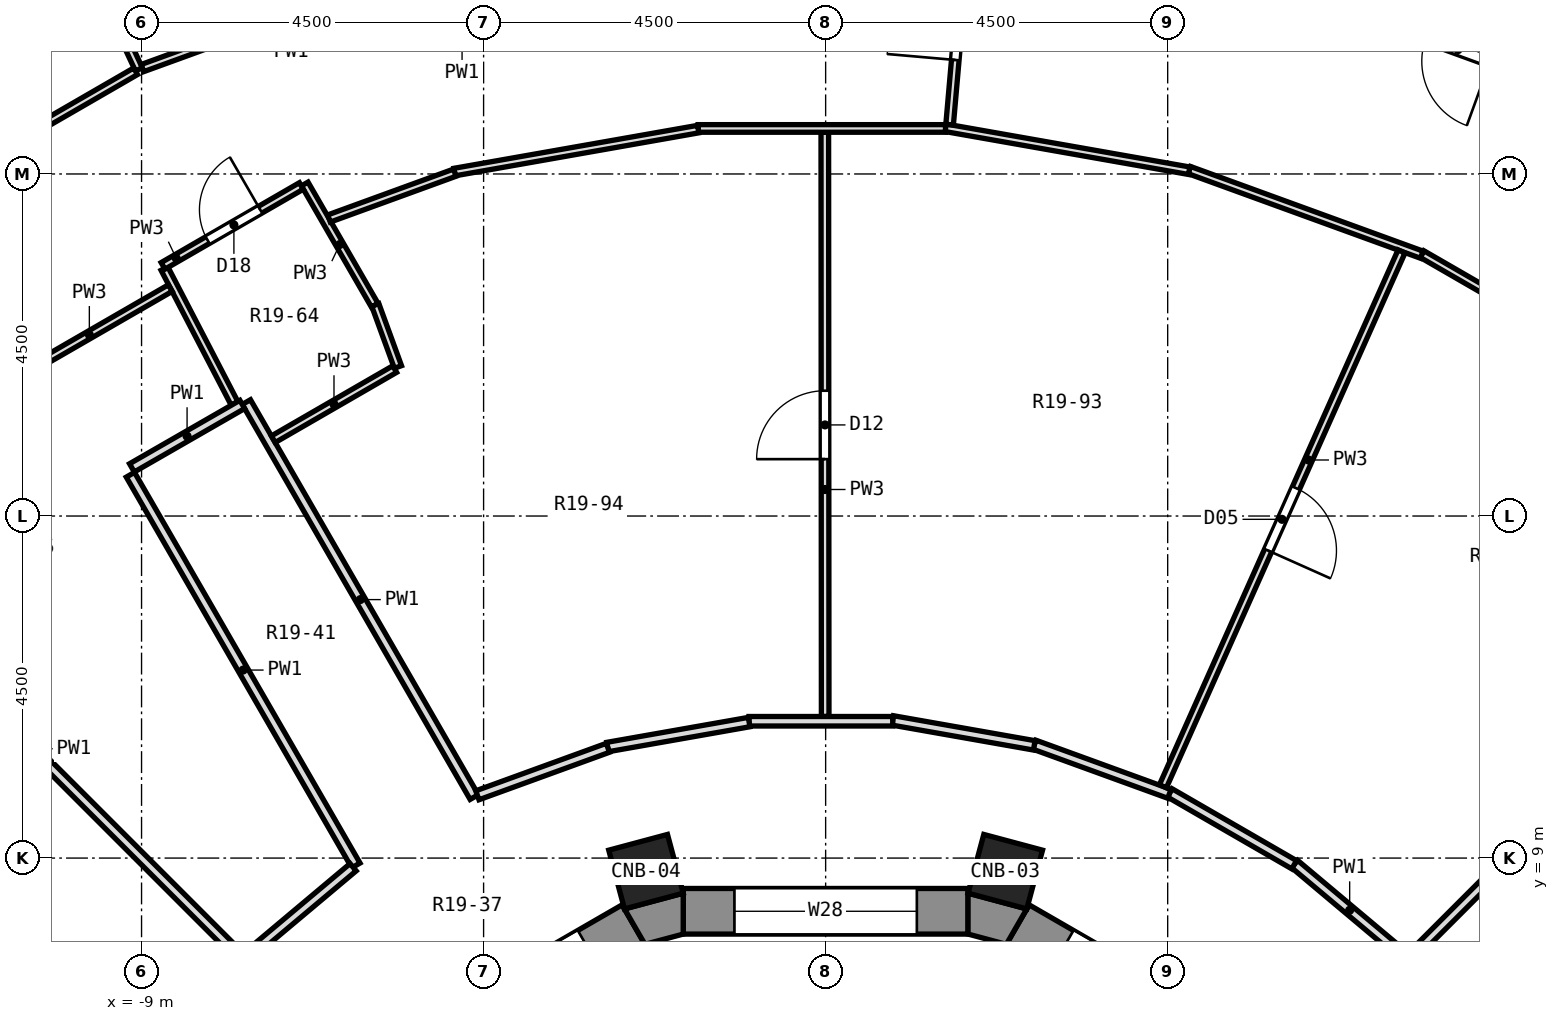
"""IFC4 building model, lengths in metres.
Left out: names, types, materials, properties, quantities, classifications, styles, units other than length and angle.
Written with IfcOpenShell. Run it as: python <this file> out.ifc"""

import sys

from ifc_helpers import new_model, si_unit, direction, frame, frame_2d, origin, origin_2d, place, context, subcontext, project, spatial, polyline, rectangle, outline, extrude, element, fill, save


model = new_model("IFC4")
c1 = context("Model", 3, precision=1e-05, world=origin(), true_north=direction((0.0, 1.0)))
c2 = subcontext(c1, "Body", "Model", "MODEL_VIEW")
j1 = project(units=[si_unit("LENGTHUNIT", "METRE"), si_unit("PLANEANGLEUNIT", "RADIAN")], contexts=[c1])
p1 = place(None, origin())
s1 = spatial("IfcSite", under=j1, at=p1, CompositionType="ELEMENT")
p2 = place(p1, origin())
s2 = spatial("IfcBuilding", under=s1, at=p2, CompositionType="ELEMENT")
p3 = place(p2, frame((0.0, 0.0, 111.7)))
s3 = spatial("IfcBuildingStorey", under=s2, at=p3, CompositionType="ELEMENT", Elevation=111.7)
for number, where, z_axis, x_axis in (
    (1, (2.364, 8.821, 0.0), (0.0, 0.0, 1.0), (0.259, 0.966, 0.0)),
    (2, (-2.364, 8.821, 0.0), (0.0, 0.0, 1.0), (-0.259, 0.966, 0.0)),
):
    element("IfcColumn", number, at=place(p3, frame(where, z_axis=z_axis, x_axis=x_axis)), inside=s3, PredefinedType="COLUMN", context=c2, shape_type="SweptSolid", body=[
        extrude(rectangle(XDim=0.8, YDim=0.8, at=origin_2d()), origin(), (0.0, 0.0, 1.0), 3.3),
    ])
p4 = place(p3, frame((5.773, 6.251, 0.0), z_axis=(0.0, 0.0, 1.0), x_axis=(-0.86604563398, 0.499964958637, 0.0)))
e3 = element("IfcWall", 3, at=p4, inside=s3, PredefinedType="SOLIDWALL", context=c2, shape_type="SweptSolid", body=[
    extrude(rectangle(XDim=3.747, YDim=0.6, at=frame_2d((1.874, 0.0))), origin(), (0.0, 0.0, 1.0), 2.8),
])
p5 = place(p4, frame((0.674, 0.0, 0.9)))
e4 = element("IfcOpeningElement", 4, at=p5, cuts=e3, PredefinedType="OPENING", context=c2, shape_type="SweptSolid", body=[
    extrude(rectangle(XDim=2.4, YDim=1.8, at=frame_2d((1.2, 0.9))), frame((0.0, 0.312, 0.0), z_axis=(0.0, -1.0, 0.0), x_axis=(1.0, 0.0, 0.0)), (0.0, 0.0, 1.0), 0.624),
])
p6 = place(p3, frame((1.874, 8.3, 0.0), z_axis=(0.0, 0.0, 1.0), x_axis=(-1.0, 0.0, 0.0)))
e5 = element("IfcWall", 5, at=p6, inside=s3, PredefinedType="SOLIDWALL", context=c2, shape_type="SweptSolid", body=[
    extrude(rectangle(XDim=3.748, YDim=0.6, at=frame_2d((1.874, 0.0))), origin(), (0.0, 0.0, 1.0), 2.8),
])
p7 = place(p6, frame((0.674, 0.0, 0.9)))
e6 = element("IfcOpeningElement", 6, at=p7, cuts=e5, PredefinedType="OPENING", context=c2, shape_type="SweptSolid", body=[
    extrude(rectangle(XDim=2.4, YDim=1.8, at=frame_2d((1.2, 0.9))), frame((0.0, 0.312, 0.0), z_axis=(0.0, -1.0, 0.0), x_axis=(1.0, 0.0, 0.0)), (0.0, 0.0, 1.0), 0.624),
])
p8 = place(p3, frame((-2.527, 8.125, 0.0), z_axis=(0.0, 0.0, 1.0), x_axis=(-0.86604563398, -0.499964958637, 0.0)))
e7 = element("IfcWall", 7, at=p8, inside=s3, PredefinedType="SOLIDWALL", context=c2, shape_type="SweptSolid", body=[
    extrude(rectangle(XDim=3.747, YDim=0.6, at=frame_2d((1.874, 0.0))), origin(), (0.0, 0.0, 1.0), 2.8),
])
p9 = place(p8, frame((0.674, 0.0, 0.9)))
e8 = element("IfcOpeningElement", 8, at=p9, cuts=e7, PredefinedType="OPENING", context=c2, shape_type="SweptSolid", body=[
    extrude(rectangle(XDim=2.4, YDim=1.8, at=frame_2d((1.2, 0.9))), frame((0.0, 0.312, 0.0), z_axis=(0.0, -1.0, 0.0), x_axis=(1.0, 0.0, 0.0)), (0.0, 0.0, 1.0), 0.624),
])
p10 = place(p3, origin())
e9 = element("IfcWall", 9, at=p10, inside=s3, PredefinedType="SOLIDWALL", context=c2, shape_type="SweptSolid", body=[
    extrude(outline(polyline([(1.874, 8.538), (1.874, 8.0), (2.377, 7.865), (2.646, 8.331), (1.874, 8.538)])), origin(), (0.0, 0.0, 1.0), 2.8),
])
p11 = place(p3, origin())
e10 = element("IfcWall", 10, at=p11, inside=s3, PredefinedType="SOLIDWALL", context=c2, shape_type="SweptSolid", body=[
    extrude(outline(polyline([(-2.646, 8.331), (-2.377, 7.865), (-1.874, 8.0), (-1.874, 8.538), (-2.646, 8.331)])), origin(), (0.0, 0.0, 1.0), 2.8),
])
p12 = place(p3, frame((-0.011, 18.549, 0.0), z_axis=(0.0, 0.0, 1.0), x_axis=(0.00063524317, -0.999999798233, 0.0)))
e11 = element("IfcWall", 11, at=p12, inside=s3, PredefinedType="PARTITIONING", context=c2, shape_type="SweptSolid", body=[
    extrude(rectangle(XDim=7.687, YDim=0.1, at=frame_2d((3.843, 0.0))), origin(), (0.0, 0.0, 1.0), 2.8),
])
p13 = place(p12, frame((3.4, 0.0, 0.0)))
e12 = element("IfcOpeningElement", 12, at=p13, cuts=e11, PredefinedType="OPENING", context=c2, shape_type="SweptSolid", body=[
    extrude(rectangle(XDim=0.9, YDim=2.1, at=frame_2d((0.45, 1.05))), frame((0.0, 0.062, 0.0), z_axis=(0.0, -1.0, 0.0), x_axis=(1.0, 0.0, 0.0)), (0.0, 0.0, 1.0), 0.124),
])
p14 = place(p3, frame((-5.925, 16.279, 0.0), z_axis=(0.0, 0.0, 1.0), x_axis=(0.3425983225, -0.939481979295, 0.0)))
e13 = element("IfcWall", 13, at=p14, inside=s3, PredefinedType="PARTITIONING", context=c2, shape_type="SweptSolid", body=[
    extrude(rectangle(XDim=0.871, YDim=0.1, at=frame_2d((0.436, 0.0))), origin(), (0.0, 0.0, 1.0), 2.8),
])
p15 = place(p3, frame((-10.847, 23.26, 0.0), z_axis=(0.0, 0.0, 1.0), x_axis=(0.422829334028, -0.906209332487, 0.0)))
e14 = element("IfcWall", 14, at=p15, inside=s3, PredefinedType="PARTITIONING", context=c2, shape_type="SweptSolid", body=[
    extrude(rectangle(XDim=4.286, YDim=0.1, at=frame_2d((2.143, 0.0))), origin(), (0.0, 0.0, 1.0), 2.8),
])
p16 = place(p3, frame((-8.699, 16.756, 0.0), z_axis=(0.0, 0.0, 1.0), x_axis=(0.461029785453, -0.887384661195, 0.0)))
e15 = element("IfcWall", 15, at=p16, inside=s3, PredefinedType="PARTITIONING", context=c2, shape_type="SweptSolid", body=[
    extrude(rectangle(XDim=2.0, YDim=0.1, at=frame_2d((1.0, 0.0))), origin(), (0.0, 0.0, 1.0), 2.8),
])
p17 = place(p3, frame((-9.147, 14.043, 0.0), z_axis=(0.0, 0.0, 1.0), x_axis=(0.499891007886, -0.866088321267, 0.0)))
e16 = element("IfcWall", 16, at=p17, inside=s3, PredefinedType="PARTITIONING", context=c2, shape_type="SweptSolid", body=[
    extrude(rectangle(XDim=5.935, YDim=0.125, at=frame_2d((2.967, 0.0))), origin(), (0.0, 0.0, 1.0), 2.8),
])
p18 = place(p3, frame((-7.621, 14.999, 0.0), z_axis=(0.0, 0.0, 1.0), x_axis=(0.499745940409, -0.866172035478, 0.0)))
e17 = element("IfcWall", 17, at=p18, inside=s3, PredefinedType="PARTITIONING", context=c2, shape_type="SweptSolid", body=[
    extrude(rectangle(XDim=5.999, YDim=0.125, at=frame_2d((3.0, 0.0))), origin(), (0.0, 0.0, 1.0), 2.8),
])
p19 = place(p3, frame((-6.853, 17.868, 0.0), z_axis=(0.0, 0.0, 1.0), x_axis=(0.499963655964, -0.866046386007, 0.0)))
e18 = element("IfcWall", 18, at=p19, inside=s3, PredefinedType="PARTITIONING", context=c2, shape_type="SweptSolid", body=[
    extrude(rectangle(XDim=1.84, YDim=0.1, at=frame_2d((0.92, 0.0))), origin(), (0.0, 0.0, 1.0), 2.8),
])
p20 = place(p3, frame((-13.167, 13.167, 0.0), z_axis=(0.0, 0.0, 1.0), x_axis=(0.707106781187, -0.707106781187, 0.0)))
e19 = element("IfcWall", 19, at=p20, inside=s3, PredefinedType="PARTITIONING", context=c2, shape_type="SweptSolid", body=[
    extrude(rectangle(XDim=7.716, YDim=0.125, at=frame_2d((3.858, 0.0))), origin(), (0.0, 0.0, 1.0), 2.8),
])
p21 = place(p3, frame((6.169, 8.922, 0.0), z_axis=(0.0, 0.0, 1.0), x_axis=(0.766048022013, -0.642783344503, 0.0)))
e20 = element("IfcWall", 20, at=p21, inside=s3, PredefinedType="PARTITIONING", context=c2, shape_type="SweptSolid", body=[
    extrude(rectangle(XDim=1.892, YDim=0.125, at=frame_2d((0.946, 0.0))), origin(), (0.0, 0.0, 1.0), 2.8),
])
p22 = place(p3, frame((4.527, 9.858, 0.0), z_axis=(0.0, 0.0, 1.0), x_axis=(0.86592101019, -0.500180771434, 0.0)))
e21 = element("IfcWall", 21, at=p22, inside=s3, PredefinedType="PARTITIONING", context=c2, shape_type="SweptSolid", body=[
    extrude(rectangle(XDim=1.89, YDim=0.125, at=frame_2d((0.945, 0.0))), origin(), (0.0, 0.0, 1.0), 2.8),
])
p23 = place(p3, frame((7.846, 16.946, 0.0), z_axis=(0.0, 0.0, 1.0), x_axis=(0.866135643811, -0.499809010043, 0.0)))
e22 = element("IfcWall", 22, at=p23, inside=s3, PredefinedType="PARTITIONING", context=c2, shape_type="SweptSolid", body=[
    extrude(rectangle(XDim=3.256, YDim=0.1, at=frame_2d((1.628, 0.0))), origin(), (0.0, 0.0, 1.0), 2.8),
])
p24 = place(p23, frame((1.228, 0.0, 0.0)))
e23 = element("IfcOpeningElement", 23, at=p24, cuts=e22, PredefinedType="OPENING", context=c2, shape_type="SweptSolid", body=[
    extrude(rectangle(XDim=0.9, YDim=2.1, at=frame_2d((0.45, 1.05))), frame((0.0, 0.062, 0.0), z_axis=(0.0, -1.0, 0.0), x_axis=(1.0, 0.0, 0.0)), (0.0, 0.0, 1.0), 0.124),
])
p25 = place(p3, frame((2.746, 10.492, 0.0), z_axis=(0.0, 0.0, 1.0), x_axis=(0.939744390825, -0.341877872803, 0.0)))
e24 = element("IfcWall", 24, at=p25, inside=s3, PredefinedType="PARTITIONING", context=c2, shape_type="SweptSolid", body=[
    extrude(rectangle(XDim=1.89, YDim=0.125, at=frame_2d((0.945, 0.0))), origin(), (0.0, 0.0, 1.0), 2.8),
])
p26 = place(p3, frame((4.784, 18.051, 0.0), z_axis=(0.0, 0.0, 1.0), x_axis=(0.939697033511, -0.34200801922, 0.0)))
e25 = element("IfcWall", 25, at=p26, inside=s3, PredefinedType="PARTITIONING", context=c2, shape_type="SweptSolid", body=[
    extrude(rectangle(XDim=3.255, YDim=0.1, at=frame_2d((1.627, 0.0))), origin(), (0.0, 0.0, 1.0), 2.8),
])
p27 = place(p3, frame((7.652, 19.879, 0.0), z_axis=(0.0, 0.0, 1.0), x_axis=(0.939813657692, -0.341687413896, 0.0)))
e26 = element("IfcWall", 26, at=p27, inside=s3, PredefinedType="PARTITIONING", context=c2, shape_type="SweptSolid", body=[
    extrude(rectangle(XDim=1.409, YDim=0.125, at=frame_2d((0.705, 0.0))), origin(), (0.0, 0.0, 1.0), 2.8),
])
p28 = place(p27, frame((0.261, 0.0, 0.0)))
e27 = element("IfcOpeningElement", 27, at=p28, cuts=e26, PredefinedType="OPENING", context=c2, shape_type="SweptSolid", body=[
    extrude(rectangle(XDim=0.9, YDim=2.1, at=frame_2d((0.45, 1.05))), frame((0.0, 0.074, 0.0), z_axis=(0.0, -1.0, 0.0), x_axis=(1.0, 0.0, 0.0)), (0.0, 0.0, 1.0), 0.149),
])
p29 = place(p3, frame((0.883, 10.811, 0.0), z_axis=(0.0, 0.0, 1.0), x_axis=(0.984822536066, -0.173564317922, 0.0)))
e28 = element("IfcWall", 28, at=p29, inside=s3, PredefinedType="PARTITIONING", context=c2, shape_type="SweptSolid", body=[
    extrude(rectangle(XDim=1.891, YDim=0.125, at=frame_2d((0.945, 0.0))), origin(), (0.0, 0.0, 1.0), 2.8),
])
p30 = place(p3, frame((1.577, 18.608, 0.0), z_axis=(0.0, 0.0, 1.0), x_axis=(0.984812236301, -0.173622749755, 0.0)))
e29 = element("IfcWall", 29, at=p30, inside=s3, PredefinedType="PARTITIONING", context=c2, shape_type="SweptSolid", body=[
    extrude(rectangle(XDim=3.255, YDim=0.1, at=frame_2d((1.628, 0.0))), origin(), (0.0, 0.0, 1.0), 2.8),
])
p31 = place(p3, frame((-1.009, 10.8, 0.0), z_axis=(0.0, 0.0, 1.0), x_axis=(1.0, 0.0, 0.0)))
e30 = element("IfcWall", 30, at=p31, inside=s3, PredefinedType="PARTITIONING", context=c2, shape_type="SweptSolid", body=[
    extrude(rectangle(XDim=1.891, YDim=0.125, at=frame_2d((0.946, 0.0))), origin(), (0.0, 0.0, 1.0), 2.8),
])
p32 = place(p3, frame((-1.678, 18.599, 0.0), z_axis=(0.0, 0.0, 1.0), x_axis=(1.0, 0.0, 0.0)))
e31 = element("IfcWall", 31, at=p32, inside=s3, PredefinedType="PARTITIONING", context=c2, shape_type="SweptSolid", body=[
    extrude(rectangle(XDim=3.255, YDim=0.1, at=frame_2d((1.627, 0.0))), origin(), (0.0, 0.0, 1.0), 2.8),
])
p33 = place(p3, frame((-2.868, 10.461, 0.0), z_axis=(0.0, 0.0, 1.0), x_axis=(0.984818645033, 0.173586394613, 0.0)))
e32 = element("IfcWall", 32, at=p33, inside=s3, PredefinedType="PARTITIONING", context=c2, shape_type="SweptSolid", body=[
    extrude(rectangle(XDim=1.89, YDim=0.125, at=frame_2d((0.945, 0.0))), origin(), (0.0, 0.0, 1.0), 2.8),
])
p34 = place(p3, frame((-4.882, 18.025, 0.0), z_axis=(0.0, 0.0, 1.0), x_axis=(0.984812236301, 0.173622749755, 0.0)))
e33 = element("IfcWall", 33, at=p34, inside=s3, PredefinedType="PARTITIONING", context=c2, shape_type="SweptSolid", body=[
    extrude(rectangle(XDim=3.255, YDim=0.1, at=frame_2d((1.628, 0.0))), origin(), (0.0, 0.0, 1.0), 2.8),
])
p35 = place(p3, frame((-4.582, 9.826, 0.0), z_axis=(0.0, 0.0, 1.0), x_axis=(0.939758316357, 0.341839592261, 0.0)))
e34 = element("IfcWall", 34, at=p35, inside=s3, PredefinedType="PARTITIONING", context=c2, shape_type="SweptSolid", body=[
    extrude(rectangle(XDim=1.828, YDim=0.125, at=frame_2d((0.914, 0.0))), origin(), (0.0, 0.0, 1.0), 2.8),
])
p36 = place(p3, frame((-6.534, 17.414, 0.0), z_axis=(0.0, 0.0, 1.0), x_axis=(0.93961928365, 0.342221568275, 0.0)))
e35 = element("IfcWall", 35, at=p36, inside=s3, PredefinedType="PARTITIONING", context=c2, shape_type="SweptSolid", body=[
    extrude(rectangle(XDim=1.761, YDim=0.1, at=frame_2d((0.881, 0.0))), origin(), (0.0, 0.0, 1.0), 2.8),
])
p37 = place(p3, frame((-8.988, 19.393, 0.0), z_axis=(0.0, 0.0, 1.0), x_axis=(0.939693168022, 0.342018639804, 0.0)))
e36 = element("IfcWall", 36, at=p37, inside=s3, PredefinedType="PARTITIONING", context=c2, shape_type="SweptSolid", body=[
    extrude(rectangle(XDim=2.205, YDim=0.1, at=frame_2d((1.103, 0.0))), origin(), (0.0, 0.0, 1.0), 2.8),
])
p38 = place(p3, frame((-9.127, 14.134, 0.0), z_axis=(0.0, 0.0, 1.0), x_axis=(0.866992941954, 0.498320417604, 0.0)))
e37 = element("IfcWall", 37, at=p38, inside=s3, PredefinedType="PARTITIONING", context=c2, shape_type="SweptSolid", body=[
    extrude(rectangle(XDim=1.674, YDim=0.125, at=frame_2d((0.837, 0.0))), origin(), (0.0, 0.0, 1.0), 2.8),
])
p39 = place(p3, frame((-7.267, 14.51, 0.0), z_axis=(0.0, 0.0, 1.0), x_axis=(0.865945322787, 0.500138678712, 0.0)))
e38 = element("IfcWall", 38, at=p39, inside=s3, PredefinedType="PARTITIONING", context=c2, shape_type="SweptSolid", body=[
    extrude(rectangle(XDim=1.845, YDim=0.1, at=frame_2d((0.922, 0.0))), origin(), (0.0, 0.0, 1.0), 2.8),
])
p40 = place(p3, frame((-10.753, 15.269, 0.0), z_axis=(0.0, 0.0, 1.0), x_axis=(0.866079862983, 0.499905662036, 0.0)))
e39 = element("IfcWall", 39, at=p40, inside=s3, PredefinedType="PARTITIONING", context=c2, shape_type="SweptSolid", body=[
    extrude(rectangle(XDim=2.461, YDim=0.1, at=frame_2d((1.23, 0.0))), origin(), (0.0, 0.0, 1.0), 2.8),
])
p41 = place(p3, frame((-8.717, 16.791, 0.0), z_axis=(0.0, 0.0, 1.0), x_axis=(0.865866191869, 0.50027566179, 0.0)))
e40 = element("IfcWall", 40, at=p41, inside=s3, PredefinedType="PARTITIONING", context=c2, shape_type="SweptSolid", body=[
    extrude(rectangle(XDim=2.101, YDim=0.1, at=frame_2d((1.05, 0.0))), origin(), (0.0, 0.0, 1.0), 2.8),
])
p42 = place(p41, frame((0.677, 0.0, 0.0)))
e41 = element("IfcOpeningElement", 41, at=p42, cuts=e40, PredefinedType="OPENING", context=c2, shape_type="SweptSolid", body=[
    extrude(rectangle(XDim=0.8, YDim=2.1, at=frame_2d((0.4, 1.05))), frame((0.0, 0.062, 0.0), z_axis=(0.0, -1.0, 0.0), x_axis=(1.0, 0.0, 0.0)), (0.0, 0.0, 1.0), 0.124),
])
p43 = place(p3, frame((-10.901, 18.298, 0.0), z_axis=(0.0, 0.0, 1.0), x_axis=(0.865841622723, 0.50031818312, 0.0)))
e42 = element("IfcWall", 42, at=p43, inside=s3, PredefinedType="PARTITIONING", context=c2, shape_type="SweptSolid", body=[
    extrude(rectangle(XDim=2.105, YDim=0.1, at=frame_2d((1.052, 0.0))), origin(), (0.0, 0.0, 1.0), 2.8),
])
p44 = place(p3, frame((-7.617, 7.704, 0.0), z_axis=(0.0, 0.0, 1.0), x_axis=(0.7660388271, 0.642794302538, 0.0)))
e43 = element("IfcWall", 43, at=p44, inside=s3, PredefinedType="PARTITIONING", context=c2, shape_type="SweptSolid", body=[
    extrude(rectangle(XDim=1.828, YDim=0.125, at=frame_2d((0.914, 0.0))), origin(), (0.0, 0.0, 1.0), 2.8),
])
p45 = place(p3, frame((7.71, 7.71, 0.0), z_axis=(0.0, 0.0, 1.0), x_axis=(0.707106781187, 0.707106781187, 0.0)))
e44 = element("IfcWall", 44, at=p45, inside=s3, PredefinedType="PARTITIONING", context=c2, shape_type="SweptSolid", body=[
    extrude(rectangle(XDim=7.587, YDim=0.125, at=frame_2d((3.793, 0.0))), origin(), (0.0, 0.0, 1.0), 2.8),
])
p46 = place(p3, frame((4.437, 9.945, 0.0), z_axis=(0.0, 0.0, 1.0), x_axis=(0.407452204653, 0.913226533191, 0.0)))
e45 = element("IfcWall", 45, at=p46, inside=s3, PredefinedType="PARTITIONING", context=c2, shape_type="SweptSolid", body=[
    extrude(rectangle(XDim=7.705, YDim=0.1, at=frame_2d((3.853, 0.0))), origin(), (0.0, 0.0, 1.0), 2.8),
])
p47 = place(p46, frame((3.395, 0.0, 0.0)))
e46 = element("IfcOpeningElement", 46, at=p47, cuts=e45, PredefinedType="OPENING", context=c2, shape_type="SweptSolid", body=[
    extrude(rectangle(XDim=0.9, YDim=2.1, at=frame_2d((0.45, 1.05))), frame((0.0, 0.062, 0.0), z_axis=(0.0, -1.0, 0.0), x_axis=(1.0, 0.0, 0.0)), (0.0, 0.0, 1.0), 0.124),
])
p48 = place(p3, frame((1.631, 18.649, 0.0), z_axis=(0.0, 0.0, 1.0), x_axis=(0.087251550035, 0.996186311398, 0.0)))
e47 = element("IfcWall", 47, at=p48, inside=s3, PredefinedType="PARTITIONING", context=c2, shape_type="SweptSolid", body=[
    extrude(rectangle(XDim=6.945, YDim=0.1, at=frame_2d((3.472, 0.0))), origin(), (0.0, 0.0, 1.0), 2.8),
])
p49 = place(p48, frame((0.854, 0.0, 0.0)))
e48 = element("IfcOpeningElement", 48, at=p49, cuts=e47, PredefinedType="OPENING", context=c2, shape_type="SweptSolid", body=[
    extrude(rectangle(XDim=0.9, YDim=2.1, at=frame_2d((0.45, 1.05))), frame((0.0, 0.062, 0.0), z_axis=(0.0, -1.0, 0.0), x_axis=(1.0, 0.0, 0.0)), (0.0, 0.0, 1.0), 0.124),
])
p50 = place(p5, origin())
e49 = element("IfcWindow", 49, at=p50, inside=s3, PartitioningType="SINGLE_PANEL", PredefinedType="WINDOW", context=c2, shape_type="SweptSolid", body=[
    extrude(rectangle(XDim=2.4, YDim=1.8, at=frame_2d((1.2, 0.9))), frame((0.0, -0.12, 0.0), z_axis=(0.0, -1.0, 0.0), x_axis=(1.0, 0.0, 0.0)), (0.0, 0.0, 1.0), 0.06),
])
fill(e4, e49)
p51 = place(p7, origin())
e50 = element("IfcWindow", 50, at=p51, inside=s3, PartitioningType="SINGLE_PANEL", PredefinedType="WINDOW", context=c2, shape_type="SweptSolid", body=[
    extrude(rectangle(XDim=2.4, YDim=1.8, at=frame_2d((1.2, 0.9))), frame((0.0, -0.12, 0.0), z_axis=(0.0, -1.0, 0.0), x_axis=(1.0, 0.0, 0.0)), (0.0, 0.0, 1.0), 0.06),
])
fill(e6, e50)
p52 = place(p9, origin())
e51 = element("IfcWindow", 51, at=p52, inside=s3, PartitioningType="SINGLE_PANEL", PredefinedType="WINDOW", context=c2, shape_type="SweptSolid", body=[
    extrude(rectangle(XDim=2.4, YDim=1.8, at=frame_2d((1.2, 0.9))), frame((0.0, -0.12, 0.0), z_axis=(0.0, -1.0, 0.0), x_axis=(1.0, 0.0, 0.0)), (0.0, 0.0, 1.0), 0.06),
])
fill(e8, e51)
p53 = place(p47, frame((0.9, 0.0, 0.0), z_axis=(0.0, 0.0, 1.0), x_axis=(-1.0, 0.0, 0.0)))
e52 = element("IfcDoor", 52, at=p53, inside=s3, OperationType="SINGLE_SWING_RIGHT", PredefinedType="DOOR", context=c2, shape_type="SweptSolid", body=[
    extrude(rectangle(XDim=0.9, YDim=2.1, at=frame_2d((0.45, 1.05))), frame((0.0, 0.025, 0.0), z_axis=(0.0, -1.0, 0.0), x_axis=(1.0, 0.0, 0.0)), (0.0, 0.0, 1.0), 0.05),
])
fill(e46, e52)
p54 = place(p28, frame((0.9, 0.0, 0.0), z_axis=(0.0, 0.0, 1.0), x_axis=(-1.0, 0.0, 0.0)))
e53 = element("IfcDoor", 53, at=p54, inside=s3, OperationType="SINGLE_SWING_LEFT", PredefinedType="DOOR", context=c2, shape_type="SweptSolid", body=[
    extrude(rectangle(XDim=0.9, YDim=2.1, at=frame_2d((0.45, 1.05))), frame((0.0, 0.025, 0.0), z_axis=(0.0, -1.0, 0.0), x_axis=(1.0, 0.0, 0.0)), (0.0, 0.0, 1.0), 0.05),
])
fill(e27, e53)
p55 = place(p49, origin())
e54 = element("IfcDoor", 54, at=p55, inside=s3, OperationType="SINGLE_SWING_LEFT", PredefinedType="DOOR", context=c2, shape_type="SweptSolid", body=[
    extrude(rectangle(XDim=0.9, YDim=2.1, at=frame_2d((0.45, 1.05))), frame((0.0, 0.025, 0.0), z_axis=(0.0, -1.0, 0.0), x_axis=(1.0, 0.0, 0.0)), (0.0, 0.0, 1.0), 0.05),
])
fill(e48, e54)
p56 = place(p13, frame((0.9, 0.0, 0.0), z_axis=(0.0, 0.0, 1.0), x_axis=(-1.0, 0.0, 0.0)))
e55 = element("IfcDoor", 55, at=p56, inside=s3, OperationType="SINGLE_SWING_LEFT", PredefinedType="DOOR", context=c2, shape_type="SweptSolid", body=[
    extrude(rectangle(XDim=0.9, YDim=2.1, at=frame_2d((0.45, 1.05))), frame((0.0, 0.025, 0.0), z_axis=(0.0, -1.0, 0.0), x_axis=(1.0, 0.0, 0.0)), (0.0, 0.0, 1.0), 0.05),
])
fill(e12, e55)
p57 = place(p42, origin())
e56 = element("IfcDoor", 56, at=p57, inside=s3, OperationType="SINGLE_SWING_RIGHT", PredefinedType="DOOR", context=c2, shape_type="SweptSolid", body=[
    extrude(rectangle(XDim=0.8, YDim=2.1, at=frame_2d((0.4, 1.05))), frame((0.0, 0.025, 0.0), z_axis=(0.0, -1.0, 0.0), x_axis=(1.0, 0.0, 0.0)), (0.0, 0.0, 1.0), 0.05),
])
fill(e41, e56)
save(model, sys.argv[1])
